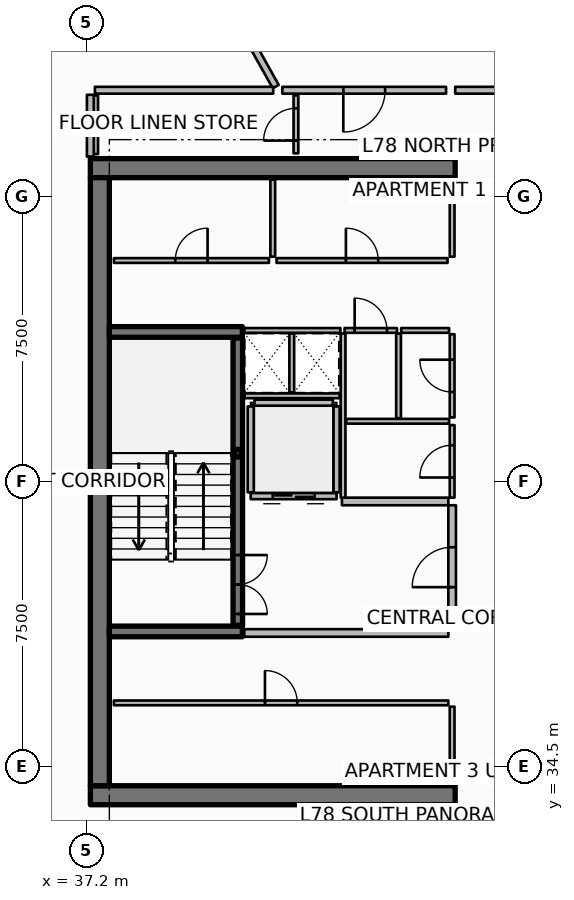
"""IFC4 building model, lengths in metres.
Left out: names, types, materials, properties, quantities, classifications, styles, units other than length and angle.
Written with IfcOpenShell. Run it as: python <this file> out.ifc"""

import sys

from ifc_helpers import new_model, si_unit, direction, frame, frame_2d, origin, origin_2d, place, context, subcontext, project, spatial, rectangle, hollow_rectangle, extrude, element, fill, save


model = new_model("IFC4")
c1 = context("Model", 3, precision=1e-05, world=origin(), true_north=direction((0.0, 1.0)))
c2 = subcontext(c1, "Body", "Model", "MODEL_VIEW")
j1 = project(units=[si_unit("LENGTHUNIT", "METRE"), si_unit("PLANEANGLEUNIT", "RADIAN")], contexts=[c1])
p1 = place(None, origin())
s1 = spatial("IfcSite", under=j1, at=p1, CompositionType="ELEMENT")
p2 = place(p1, origin())
s2 = spatial("IfcBuilding", under=s1, at=p2, CompositionType="ELEMENT")
p3 = place(p2, frame((0.0, 0.0, 309.85)))
s3 = spatial("IfcBuildingStorey", under=s2, at=p3, CompositionType="ELEMENT", Elevation=309.85)
for number, where, z_axis, x_axis in (
    (1, (37.3, 33.75, 0.0), (0.0, 0.0, 1.0), (1.0, 0.0, 0.0)),
    (2, (37.3, 50.25, 0.0), (0.0, 0.0, 1.0), (1.0, 0.0, 0.0)),
):
    element("IfcWall", number, at=place(p3, frame(where, z_axis=z_axis, x_axis=x_axis)), inside=s3, PredefinedType="SHEAR", context=c2, shape_type="SweptSolid", body=[
        extrude(rectangle(XDim=9.6, YDim=0.5, at=frame_2d((4.8, 0.0))), origin(), (0.0, 0.0, 1.0), 3.85),
    ])
p4 = place(p3, frame((37.55, 34.0, 0.0), z_axis=(0.0, 0.0, 1.0), x_axis=(0.0, 1.0, 0.0)))
e3 = element("IfcWall", 3, at=p4, inside=s3, PredefinedType="SHEAR", context=c2, shape_type="SweptSolid", body=[
    extrude(rectangle(XDim=16.0, YDim=0.5, at=frame_2d((8.0, 0.0))), origin(), (0.0, 0.0, 1.0), 3.85),
])
for number, where, z_axis, x_axis in (
    (4, (37.8, 38.06, 0.0), (0.0, 0.0, 1.0), (1.0, 0.0, 0.0)),
    (5, (37.8, 45.94, 0.0), (0.0, 0.0, 1.0), (1.0, 0.0, 0.0)),
):
    element("IfcWall", number, at=place(p3, frame(where, z_axis=z_axis, x_axis=x_axis)), inside=s3, PredefinedType="SHEAR", context=c2, shape_type="SweptSolid", body=[
        extrude(rectangle(XDim=3.5, YDim=0.28, at=frame_2d((1.75, 0.0))), origin(), (0.0, 0.0, 1.0), 3.85),
    ])
p5 = place(p3, frame((41.18, 42.75, 0.0), z_axis=(0.0, 0.0, 1.0), x_axis=(1.0, 0.0, 0.0)))
e6 = element("IfcColumn", 6, at=p5, inside=s3, PredefinedType="COLUMN", context=c2, shape_type="SweptSolid", body=[
    extrude(hollow_rectangle(XDim=0.2, YDim=0.2, WallThickness=0.01, InnerFilletRadius=0.01, OuterFilletRadius=0.02, at=origin_2d()), origin(), (0.0, 0.0, 1.0), 1.72),
])
p6 = place(p3, frame((41.18, 38.22, 0.0), z_axis=(0.0, 0.0, 1.0), x_axis=(0.0, 1.0, 0.0)))
e7 = element("IfcWall", 7, at=p6, inside=s3, PredefinedType="SOLIDWALL", context=c2, shape_type="SweptSolid", body=[
    extrude(rectangle(XDim=7.56, YDim=0.25, at=frame_2d((3.78, 0.0))), origin(), (0.0, 0.0, 1.0), 3.45),
])
p7 = place(p6, frame((0.3, 0.0, 0.0)))
e8 = element("IfcOpeningElement", 8, at=p7, cuts=e7, PredefinedType="OPENING", context=c2, shape_type="SweptSolid", body=[
    extrude(rectangle(XDim=1.55, YDim=2.15, at=frame_2d((0.775, 1.075))), frame((0.0, 0.135, 0.0), z_axis=(0.0, -1.0, 0.0), x_axis=(1.0, 0.0, 0.0)), (0.0, 0.0, 1.0), 0.27),
])
p8 = place(p3, frame((43.78, 41.62, 0.0), z_axis=(0.0, 0.0, 1.0), x_axis=(-1.0, 0.0, 0.0)))
e9 = element("IfcWall", 9, at=p8, inside=s3, PredefinedType="PARTITIONING", context=c2, shape_type="SweptSolid", body=[
    extrude(rectangle(XDim=2.26, YDim=0.16, at=frame_2d((1.13, 0.0))), origin(), (0.0, 0.0, 1.0), 3.45),
])
p9 = place(p8, frame((0.58, 0.0, 0.0)))
e10 = element("IfcOpeningElement", 10, at=p9, cuts=e9, PredefinedType="OPENING", context=c2, shape_type="SweptSolid", body=[
    extrude(rectangle(XDim=1.1, YDim=2.1, at=frame_2d((0.55, 1.05))), frame((0.0, 0.09, 0.0), z_axis=(0.0, -1.0, 0.0), x_axis=(1.0, 0.0, 0.0)), (0.0, 0.0, 1.0), 0.18),
])
for number, where, z_axis, x_axis in (
    (11, (43.78, 41.72, 0.0), (0.0, 0.0, 1.0), (0.0, 1.0, 0.0)),
    (12, (41.52, 41.72, 0.0), (0.0, 0.0, 1.0), (0.0, 1.0, 0.0)),
):
    element("IfcWall", number, at=place(p3, frame(where, z_axis=z_axis, x_axis=x_axis)), inside=s3, PredefinedType="PARTITIONING", context=c2, shape_type="SweptSolid", body=[
        extrude(rectangle(XDim=2.26, YDim=0.16, at=frame_2d((1.13, 0.0))), origin(), (0.0, 0.0, 1.0), 3.45),
    ])
p10 = place(p3, frame((41.62, 44.08, 0.0), z_axis=(0.0, 0.0, 1.0), x_axis=(1.0, 0.0, 0.0)))
e13 = element("IfcWall", 13, at=p10, inside=s3, PredefinedType="PARTITIONING", context=c2, shape_type="SweptSolid", body=[
    extrude(rectangle(XDim=2.06, YDim=0.16, at=frame_2d((1.03, 0.0))), origin(), (0.0, 0.0, 1.0), 3.45),
])
p11 = place(p3, frame((46.82, 34.05, 0.0), z_axis=(0.0, 0.0, 1.0), x_axis=(0.0, 1.0, 0.0)))
e14 = element("IfcWall", 14, at=p11, inside=s3, PredefinedType="PARTITIONING", context=c2, shape_type="SweptSolid", body=[
    extrude(rectangle(XDim=2.03, YDim=0.125, at=frame_2d((1.015, 0.0))), origin(), (0.0, 0.0, 1.0), 2.89),
])
p12 = place(p3, frame((37.92, 36.18, 0.0), z_axis=(0.0, 0.0, 1.0), x_axis=(1.0, 0.0, 0.0)))
e15 = element("IfcWall", 15, at=p12, inside=s3, PredefinedType="PARTITIONING", context=c2, shape_type="SweptSolid", body=[
    extrude(rectangle(XDim=8.8, YDim=0.125, at=frame_2d((4.4, 0.0))), origin(), (0.0, 0.0, 1.0), 2.89),
])
p13 = place(p12, frame((3.975, 0.0, 0.0)))
e16 = element("IfcOpeningElement", 16, at=p13, cuts=e15, PredefinedType="OPENING", context=c2, shape_type="SweptSolid", body=[
    extrude(rectangle(XDim=0.85, YDim=2.06, at=frame_2d((0.425, 1.03))), frame((0.0, 0.073, 0.0), z_axis=(0.0, -1.0, 0.0), x_axis=(1.0, 0.0, 0.0)), (0.0, 0.0, 1.0), 0.145),
])
for number, where, z_axis, x_axis in (
    (17, (46.82, 47.92, 0.0), (0.0, 0.0, 1.0), (0.0, 1.0, 0.0)),
    (18, (42.1, 47.92, 0.0), (0.0, 0.0, 1.0), (0.0, 1.0, 0.0)),
):
    element("IfcWall", number, at=place(p3, frame(where, z_axis=z_axis, x_axis=x_axis)), inside=s3, PredefinedType="PARTITIONING", context=c2, shape_type="SweptSolid", body=[
        extrude(rectangle(XDim=2.03, YDim=0.125, at=frame_2d((1.015, 0.0))), origin(), (0.0, 0.0, 1.0), 2.89),
    ])
p14 = place(p3, frame((37.92, 47.82, 0.0), z_axis=(0.0, 0.0, 1.0), x_axis=(1.0, 0.0, 0.0)))
e19 = element("IfcWall", 19, at=p14, inside=s3, PredefinedType="PARTITIONING", context=c2, shape_type="SweptSolid", body=[
    extrude(rectangle(XDim=4.08, YDim=0.125, at=frame_2d((2.04, 0.0))), origin(), (0.0, 0.0, 1.0), 2.89),
])
p15 = place(p14, frame((1.615, 0.0, 0.0)))
e20 = element("IfcOpeningElement", 20, at=p15, cuts=e19, PredefinedType="OPENING", context=c2, shape_type="SweptSolid", body=[
    extrude(rectangle(XDim=0.85, YDim=2.06, at=frame_2d((0.425, 1.03))), frame((0.0, 0.073, 0.0), z_axis=(0.0, -1.0, 0.0), x_axis=(1.0, 0.0, 0.0)), (0.0, 0.0, 1.0), 0.145),
])
p16 = place(p3, frame((42.2, 47.82, 0.0), z_axis=(0.0, 0.0, 1.0), x_axis=(1.0, 0.0, 0.0)))
e21 = element("IfcWall", 21, at=p16, inside=s3, PredefinedType="PARTITIONING", context=c2, shape_type="SweptSolid", body=[
    extrude(rectangle(XDim=4.5, YDim=0.125, at=frame_2d((2.25, 0.0))), origin(), (0.0, 0.0, 1.0), 2.89),
])
p17 = place(p16, frame((1.825, 0.0, 0.0)))
e22 = element("IfcOpeningElement", 22, at=p17, cuts=e21, PredefinedType="OPENING", context=c2, shape_type="SweptSolid", body=[
    extrude(rectangle(XDim=0.85, YDim=2.06, at=frame_2d((0.425, 1.03))), frame((0.0, 0.073, 0.0), z_axis=(0.0, -1.0, 0.0), x_axis=(1.0, 0.0, 0.0)), (0.0, 0.0, 1.0), 0.145),
])
p18 = place(p3, frame((41.35, 38.02, 0.0), z_axis=(0.0, 0.0, 1.0), x_axis=(1.0, 0.0, 0.0)))
e23 = element("IfcWall", 23, at=p18, inside=s3, PredefinedType="PARTITIONING", context=c2, shape_type="SweptSolid", body=[
    extrude(rectangle(XDim=5.37, YDim=0.2, at=frame_2d((2.685, 0.0))), origin(), (0.0, 0.0, 1.0), 3.45),
])
p19 = place(p3, frame((43.92, 41.48, 0.0), z_axis=(0.0, 0.0, 1.0), x_axis=(1.0, 0.0, 0.0)))
e24 = element("IfcWall", 24, at=p19, inside=s3, PredefinedType="PARTITIONING", context=c2, shape_type="SweptSolid", body=[
    extrude(rectangle(XDim=2.8, YDim=0.2, at=frame_2d((1.4, 0.0))), origin(), (0.0, 0.0, 1.0), 3.45),
])
p20 = place(p3, frame((46.82, 38.12, 0.0), z_axis=(0.0, 0.0, 1.0), x_axis=(0.0, 1.0, 0.0)))
e25 = element("IfcWall", 25, at=p20, inside=s3, PredefinedType="PARTITIONING", context=c2, shape_type="SweptSolid", body=[
    extrude(rectangle(XDim=3.26, YDim=0.2, at=frame_2d((1.63, 0.0))), origin(), (0.0, 0.0, 1.0), 3.45),
])
p21 = place(p20, frame((1.105, 0.0, 0.0)))
e26 = element("IfcOpeningElement", 26, at=p21, cuts=e25, PredefinedType="OPENING", context=c2, shape_type="SweptSolid", body=[
    extrude(rectangle(XDim=1.05, YDim=2.1, at=frame_2d((0.525, 1.05))), frame((0.0, 0.11, 0.0), z_axis=(0.0, -1.0, 0.0), x_axis=(1.0, 0.0, 0.0)), (0.0, 0.0, 1.0), 0.22),
])
p22 = place(p3, frame((41.36, 44.26, 0.0), z_axis=(0.0, 0.0, 1.0), x_axis=(1.0, 0.0, 0.0)))
e27 = element("IfcWall", 27, at=p22, inside=s3, PredefinedType="PARTITIONING", context=c2, shape_type="SweptSolid", body=[
    extrude(rectangle(XDim=2.5, YDim=0.125, at=frame_2d((1.25, 0.0))), origin(), (0.0, 0.0, 1.0), 2.89),
])
p23 = place(p3, frame((42.6, 44.35, 0.0), z_axis=(0.0, 0.0, 1.0), x_axis=(0.0, 1.0, 0.0)))
e28 = element("IfcWall", 28, at=p23, inside=s3, PredefinedType="PARTITIONING", context=c2, shape_type="SweptSolid", body=[
    extrude(rectangle(XDim=1.55, YDim=0.125, at=frame_2d((0.775, 0.0))), origin(), (0.0, 0.0, 1.0), 2.89),
])
p24 = place(p3, frame((43.95, 41.58, 0.0), z_axis=(0.0, 0.0, 1.0), x_axis=(0.0, 1.0, 0.0)))
e29 = element("IfcWall", 29, at=p24, inside=s3, PredefinedType="PARTITIONING", context=c2, shape_type="SweptSolid", body=[
    extrude(rectangle(XDim=4.32, YDim=0.125, at=frame_2d((2.16, 0.0))), origin(), (0.0, 0.0, 1.0), 2.89),
])
p25 = place(p3, frame((44.03, 43.59, 0.0), z_axis=(0.0, 0.0, 1.0), x_axis=(1.0, 0.0, 0.0)))
e30 = element("IfcWall", 30, at=p25, inside=s3, PredefinedType="PARTITIONING", context=c2, shape_type="SweptSolid", body=[
    extrude(rectangle(XDim=2.71, YDim=0.125, at=frame_2d((1.355, 0.0))), origin(), (0.0, 0.0, 1.0), 2.89),
])
p26 = place(p3, frame((45.41, 43.67, 0.0), z_axis=(0.0, 0.0, 1.0), x_axis=(0.0, 1.0, 0.0)))
e31 = element("IfcWall", 31, at=p26, inside=s3, PredefinedType="PARTITIONING", context=c2, shape_type="SweptSolid", body=[
    extrude(rectangle(XDim=2.23, YDim=0.125, at=frame_2d((1.115, 0.0))), origin(), (0.0, 0.0, 1.0), 2.89),
])
p27 = place(p3, frame((46.82, 41.58, 0.0), z_axis=(0.0, 0.0, 1.0), x_axis=(0.0, 1.0, 0.0)))
e32 = element("IfcWall", 32, at=p27, inside=s3, PredefinedType="PARTITIONING", context=c2, shape_type="SweptSolid", body=[
    extrude(rectangle(XDim=1.91, YDim=0.125, at=frame_2d((0.955, 0.0))), origin(), (0.0, 0.0, 1.0), 2.89),
])
p28 = place(p27, frame((0.53, 0.0, 0.0)))
e33 = element("IfcOpeningElement", 33, at=p28, cuts=e32, PredefinedType="OPENING", context=c2, shape_type="SweptSolid", body=[
    extrude(rectangle(XDim=0.85, YDim=2.06, at=frame_2d((0.425, 1.03))), frame((0.0, 0.073, 0.0), z_axis=(0.0, -1.0, 0.0), x_axis=(1.0, 0.0, 0.0)), (0.0, 0.0, 1.0), 0.145),
])
p29 = place(p3, frame((46.82, 43.69, 0.0), z_axis=(0.0, 0.0, 1.0), x_axis=(0.0, 1.0, 0.0)))
e34 = element("IfcWall", 34, at=p29, inside=s3, PredefinedType="PARTITIONING", context=c2, shape_type="SweptSolid", body=[
    extrude(rectangle(XDim=2.19, YDim=0.125, at=frame_2d((1.095, 0.0))), origin(), (0.0, 0.0, 1.0), 2.89),
])
p30 = place(p29, frame((0.67, 0.0, 0.0)))
e35 = element("IfcOpeningElement", 35, at=p30, cuts=e34, PredefinedType="OPENING", context=c2, shape_type="SweptSolid", body=[
    extrude(rectangle(XDim=0.85, YDim=2.06, at=frame_2d((0.425, 1.03))), frame((0.0, 0.073, 0.0), z_axis=(0.0, -1.0, 0.0), x_axis=(1.0, 0.0, 0.0)), (0.0, 0.0, 1.0), 0.145),
])
p31 = place(p3, frame((41.35, 45.98, 0.0), z_axis=(0.0, 0.0, 1.0), x_axis=(1.0, 0.0, 0.0)))
e36 = element("IfcWall", 36, at=p31, inside=s3, PredefinedType="PARTITIONING", context=c2, shape_type="SweptSolid", body=[
    extrude(rectangle(XDim=2.53, YDim=0.125, at=frame_2d((1.265, 0.0))), origin(), (0.0, 0.0, 1.0), 2.89),
])
p32 = place(p3, frame((43.99, 45.98, 0.0), z_axis=(0.0, 0.0, 1.0), x_axis=(1.0, 0.0, 0.0)))
e37 = element("IfcWall", 37, at=p32, inside=s3, PredefinedType="PARTITIONING", context=c2, shape_type="SweptSolid", body=[
    extrude(rectangle(XDim=1.38, YDim=0.125, at=frame_2d((0.69, 0.0))), origin(), (0.0, 0.0, 1.0), 2.89),
])
p33 = place(p32, frame((0.265, 0.0, 0.0)))
e38 = element("IfcOpeningElement", 38, at=p33, cuts=e37, PredefinedType="OPENING", context=c2, shape_type="SweptSolid", body=[
    extrude(rectangle(XDim=0.85, YDim=2.06, at=frame_2d((0.425, 1.03))), frame((0.0, 0.073, 0.0), z_axis=(0.0, -1.0, 0.0), x_axis=(1.0, 0.0, 0.0)), (0.0, 0.0, 1.0), 0.145),
])
p34 = place(p3, frame((45.48, 45.98, 0.0), z_axis=(0.0, 0.0, 1.0), x_axis=(1.0, 0.0, 0.0)))
e39 = element("IfcWall", 39, at=p34, inside=s3, PredefinedType="PARTITIONING", context=c2, shape_type="SweptSolid", body=[
    extrude(rectangle(XDim=1.26, YDim=0.125, at=frame_2d((0.63, 0.0))), origin(), (0.0, 0.0, 1.0), 2.89),
])
p35 = place(p3, frame((37.44, 50.62, 0.0), z_axis=(0.0, 0.0, 1.0), x_axis=(0.0, 1.0, 0.0)))
e40 = element("IfcWall", 40, at=p35, inside=s3, PredefinedType="PARTITIONING", context=c2, shape_type="SweptSolid", body=[
    extrude(rectangle(XDim=1.54, YDim=0.125, at=frame_2d((0.77, 0.0))), origin(), (0.0, 0.0, 1.0), 2.407),
])
p36 = place(p3, frame((42.71, 50.64, 0.0), z_axis=(0.0, 0.0, 1.0), x_axis=(0.0, 1.0, 0.0)))
e41 = element("IfcWall", 41, at=p36, inside=s3, PredefinedType="PARTITIONING", context=c2, shape_type="SweptSolid", body=[
    extrude(rectangle(XDim=1.52, YDim=0.125, at=frame_2d((0.76, 0.0))), origin(), (0.0, 0.0, 1.0), 2.407),
])
p37 = place(p36, frame((0.335, 0.0, 0.0)))
e42 = element("IfcOpeningElement", 42, at=p37, cuts=e41, PredefinedType="OPENING", context=c2, shape_type="SweptSolid", body=[
    extrude(rectangle(XDim=0.85, YDim=2.06, at=frame_2d((0.425, 1.03))), frame((0.0, 0.073, 0.0), z_axis=(0.0, -1.0, 0.0), x_axis=(1.0, 0.0, 0.0)), (0.0, 0.0, 1.0), 0.145),
])
p38 = place(p3, frame((42.178, 52.396, 0.0), z_axis=(0.0, 0.0, 1.0), x_axis=(-0.48861353883, 0.872500320729, 0.0)))
e43 = element("IfcWall", 43, at=p38, inside=s3, PredefinedType="PARTITIONING", context=c2, shape_type="SweptSolid", body=[
    extrude(rectangle(XDim=10.234, YDim=0.18, at=frame_2d((5.117, 0.0))), origin(), (0.0, 0.0, 1.0), 2.407),
])
p39 = place(p3, frame((46.661, 52.3, 0.0), z_axis=(0.0, 0.0, 1.0), x_axis=(-1.0, 0.0, 0.0)))
e44 = element("IfcWall", 44, at=p39, inside=s3, PredefinedType="PARTITIONING", context=c2, shape_type="SweptSolid", body=[
    extrude(rectangle(XDim=4.309, YDim=0.18, at=frame_2d((2.155, 0.0))), origin(), (0.0, 0.0, 1.0), 2.407),
])
p40 = place(p39, frame((1.604, 0.0, 0.0)))
e45 = element("IfcOpeningElement", 45, at=p40, cuts=e44, PredefinedType="OPENING", context=c2, shape_type="SweptSolid", body=[
    extrude(rectangle(XDim=1.1, YDim=2.1, at=frame_2d((0.55, 1.05))), frame((0.0, 0.1, 0.0), z_axis=(0.0, -1.0, 0.0), x_axis=(1.0, 0.0, 0.0)), (0.0, 0.0, 1.0), 0.2),
])
p41 = place(p3, frame((50.785, 52.3, 0.0), z_axis=(0.0, 0.0, 1.0), x_axis=(-1.0, 0.0, 0.0)))
e46 = element("IfcWall", 46, at=p41, inside=s3, PredefinedType="PARTITIONING", context=c2, shape_type="SweptSolid", body=[
    extrude(rectangle(XDim=3.884, YDim=0.18, at=frame_2d((1.942, 0.0))), origin(), (0.0, 0.0, 1.0), 2.407),
])
p42 = place(p3, frame((42.112, 52.3, 0.0), z_axis=(0.0, 0.0, 1.0), x_axis=(-1.0, 0.0, 0.0)))
e47 = element("IfcWall", 47, at=p42, inside=s3, PredefinedType="PARTITIONING", context=c2, shape_type="SweptSolid", body=[
    extrude(rectangle(XDim=4.692, YDim=0.18, at=frame_2d((2.346, 0.0))), origin(), (0.0, 0.0, 1.0), 2.407),
])
p43 = place(p3, frame((37.3, 52.18, 0.0), z_axis=(0.0, 0.0, 1.0), x_axis=(0.0, -1.0, 0.0)))
e48 = element("IfcWall", 48, at=p43, inside=s3, PredefinedType="PARTITIONING", context=c2, shape_type="SweptSolid", body=[
    extrude(rectangle(XDim=1.625, YDim=0.18, at=frame_2d((0.812, 0.0))), origin(), (0.0, 0.0, 1.0), 2.407),
])
p44 = place(p3, frame((37.483, 56.112, 0.0), z_axis=(0.0, 0.0, 1.0), x_axis=(-0.718429445944, -0.695599835538, 0.0)))
e49 = element("IfcWall", 49, at=p44, inside=s3, PredefinedType="PARTITIONING", context=c2, shape_type="SweptSolid", body=[
    extrude(rectangle(XDim=4.513, YDim=0.125, at=frame_2d((2.256, 0.0))), origin(), (0.0, 0.0, 1.0), 2.407),
])
p45 = place(p44, frame((1.806, 0.0, 0.0)))
e50 = element("IfcOpeningElement", 50, at=p45, cuts=e49, PredefinedType="OPENING", context=c2, shape_type="SweptSolid", body=[
    extrude(rectangle(XDim=0.9, YDim=2.08, at=frame_2d((0.45, 1.04))), frame((0.0, 0.073, 0.0), z_axis=(0.0, -1.0, 0.0), x_axis=(1.0, 0.0, 0.0)), (0.0, 0.0, 1.0), 0.145),
])
p46 = place(p7, origin())
e51 = element("IfcDoor", 51, at=p46, inside=s3, OperationType="DOUBLE_DOOR_SINGLE_SWING", PredefinedType="DOOR", context=c2, shape_type="SweptSolid", body=[
    extrude(rectangle(XDim=1.55, YDim=2.15, at=frame_2d((0.775, 1.075))), frame((0.0, 0.025, 0.0), z_axis=(0.0, -1.0, 0.0), x_axis=(1.0, 0.0, 0.0)), (0.0, 0.0, 1.0), 0.05),
])
fill(e8, e51)
p47 = place(p9, origin())
e52 = element("IfcDoor", 52, at=p47, inside=s3, OperationType="DOUBLE_DOOR_SLIDING", PredefinedType="DOOR", context=c2, shape_type="SweptSolid", body=[
    extrude(rectangle(XDim=1.1, YDim=2.1, at=frame_2d((0.55, 1.05))), frame((0.0, 0.025, 0.0), z_axis=(0.0, -1.0, 0.0), x_axis=(1.0, 0.0, 0.0)), (0.0, 0.0, 1.0), 0.05),
])
fill(e10, e52)
p48 = place(p13, origin())
e53 = element("IfcDoor", 53, at=p48, inside=s3, OperationType="SINGLE_SWING_LEFT", PredefinedType="DOOR", context=c2, shape_type="SweptSolid", body=[
    extrude(rectangle(XDim=0.85, YDim=2.06, at=frame_2d((0.425, 1.03))), frame((0.0, 0.025, 0.0), z_axis=(0.0, -1.0, 0.0), x_axis=(1.0, 0.0, 0.0)), (0.0, 0.0, 1.0), 0.05),
])
fill(e16, e53)
p49 = place(p15, origin())
e54 = element("IfcDoor", 54, at=p49, inside=s3, OperationType="SINGLE_SWING_RIGHT", PredefinedType="DOOR", context=c2, shape_type="SweptSolid", body=[
    extrude(rectangle(XDim=0.85, YDim=2.06, at=frame_2d((0.425, 1.03))), frame((0.0, 0.025, 0.0), z_axis=(0.0, -1.0, 0.0), x_axis=(1.0, 0.0, 0.0)), (0.0, 0.0, 1.0), 0.05),
])
fill(e20, e54)
p50 = place(p17, origin())
e55 = element("IfcDoor", 55, at=p50, inside=s3, OperationType="SINGLE_SWING_LEFT", PredefinedType="DOOR", context=c2, shape_type="SweptSolid", body=[
    extrude(rectangle(XDim=0.85, YDim=2.06, at=frame_2d((0.425, 1.03))), frame((0.0, 0.025, 0.0), z_axis=(0.0, -1.0, 0.0), x_axis=(1.0, 0.0, 0.0)), (0.0, 0.0, 1.0), 0.05),
])
fill(e22, e55)
p51 = place(p21, origin())
e56 = element("IfcDoor", 56, at=p51, inside=s3, OperationType="SINGLE_SWING_LEFT", PredefinedType="DOOR", context=c2, shape_type="SweptSolid", body=[
    extrude(rectangle(XDim=1.05, YDim=2.1, at=frame_2d((0.525, 1.05))), frame((0.0, 0.025, 0.0), z_axis=(0.0, -1.0, 0.0), x_axis=(1.0, 0.0, 0.0)), (0.0, 0.0, 1.0), 0.05),
])
fill(e26, e56)
p52 = place(p28, origin())
e57 = element("IfcDoor", 57, at=p52, inside=s3, OperationType="SINGLE_SWING_LEFT", PredefinedType="DOOR", context=c2, shape_type="SweptSolid", body=[
    extrude(rectangle(XDim=0.85, YDim=2.06, at=frame_2d((0.425, 1.03))), frame((0.0, 0.025, 0.0), z_axis=(0.0, -1.0, 0.0), x_axis=(1.0, 0.0, 0.0)), (0.0, 0.0, 1.0), 0.05),
])
fill(e33, e57)
p53 = place(p30, origin())
e58 = element("IfcDoor", 58, at=p53, inside=s3, OperationType="SINGLE_SWING_RIGHT", PredefinedType="DOOR", context=c2, shape_type="SweptSolid", body=[
    extrude(rectangle(XDim=0.85, YDim=2.06, at=frame_2d((0.425, 1.03))), frame((0.0, 0.025, 0.0), z_axis=(0.0, -1.0, 0.0), x_axis=(1.0, 0.0, 0.0)), (0.0, 0.0, 1.0), 0.05),
])
fill(e35, e58)
p54 = place(p33, origin())
e59 = element("IfcDoor", 59, at=p54, inside=s3, OperationType="SINGLE_SWING_LEFT", PredefinedType="DOOR", context=c2, shape_type="SweptSolid", body=[
    extrude(rectangle(XDim=0.85, YDim=2.06, at=frame_2d((0.425, 1.03))), frame((0.0, 0.025, 0.0), z_axis=(0.0, -1.0, 0.0), x_axis=(1.0, 0.0, 0.0)), (0.0, 0.0, 1.0), 0.05),
])
fill(e38, e59)
p55 = place(p37, origin())
e60 = element("IfcDoor", 60, at=p55, inside=s3, OperationType="SINGLE_SWING_LEFT", PredefinedType="DOOR", context=c2, shape_type="SweptSolid", body=[
    extrude(rectangle(XDim=0.85, YDim=2.06, at=frame_2d((0.425, 1.03))), frame((0.0, 0.025, 0.0), z_axis=(0.0, -1.0, 0.0), x_axis=(1.0, 0.0, 0.0)), (0.0, 0.0, 1.0), 0.05),
])
fill(e42, e60)
p56 = place(p40, origin())
e61 = element("IfcDoor", 61, at=p56, inside=s3, OperationType="SINGLE_SWING_RIGHT", PredefinedType="DOOR", context=c2, shape_type="SweptSolid", body=[
    extrude(rectangle(XDim=1.1, YDim=2.1, at=frame_2d((0.55, 1.05))), frame((0.0, 0.025, 0.0), z_axis=(0.0, -1.0, 0.0), x_axis=(1.0, 0.0, 0.0)), (0.0, 0.0, 1.0), 0.05),
])
fill(e45, e61)
save(model, sys.argv[1])
